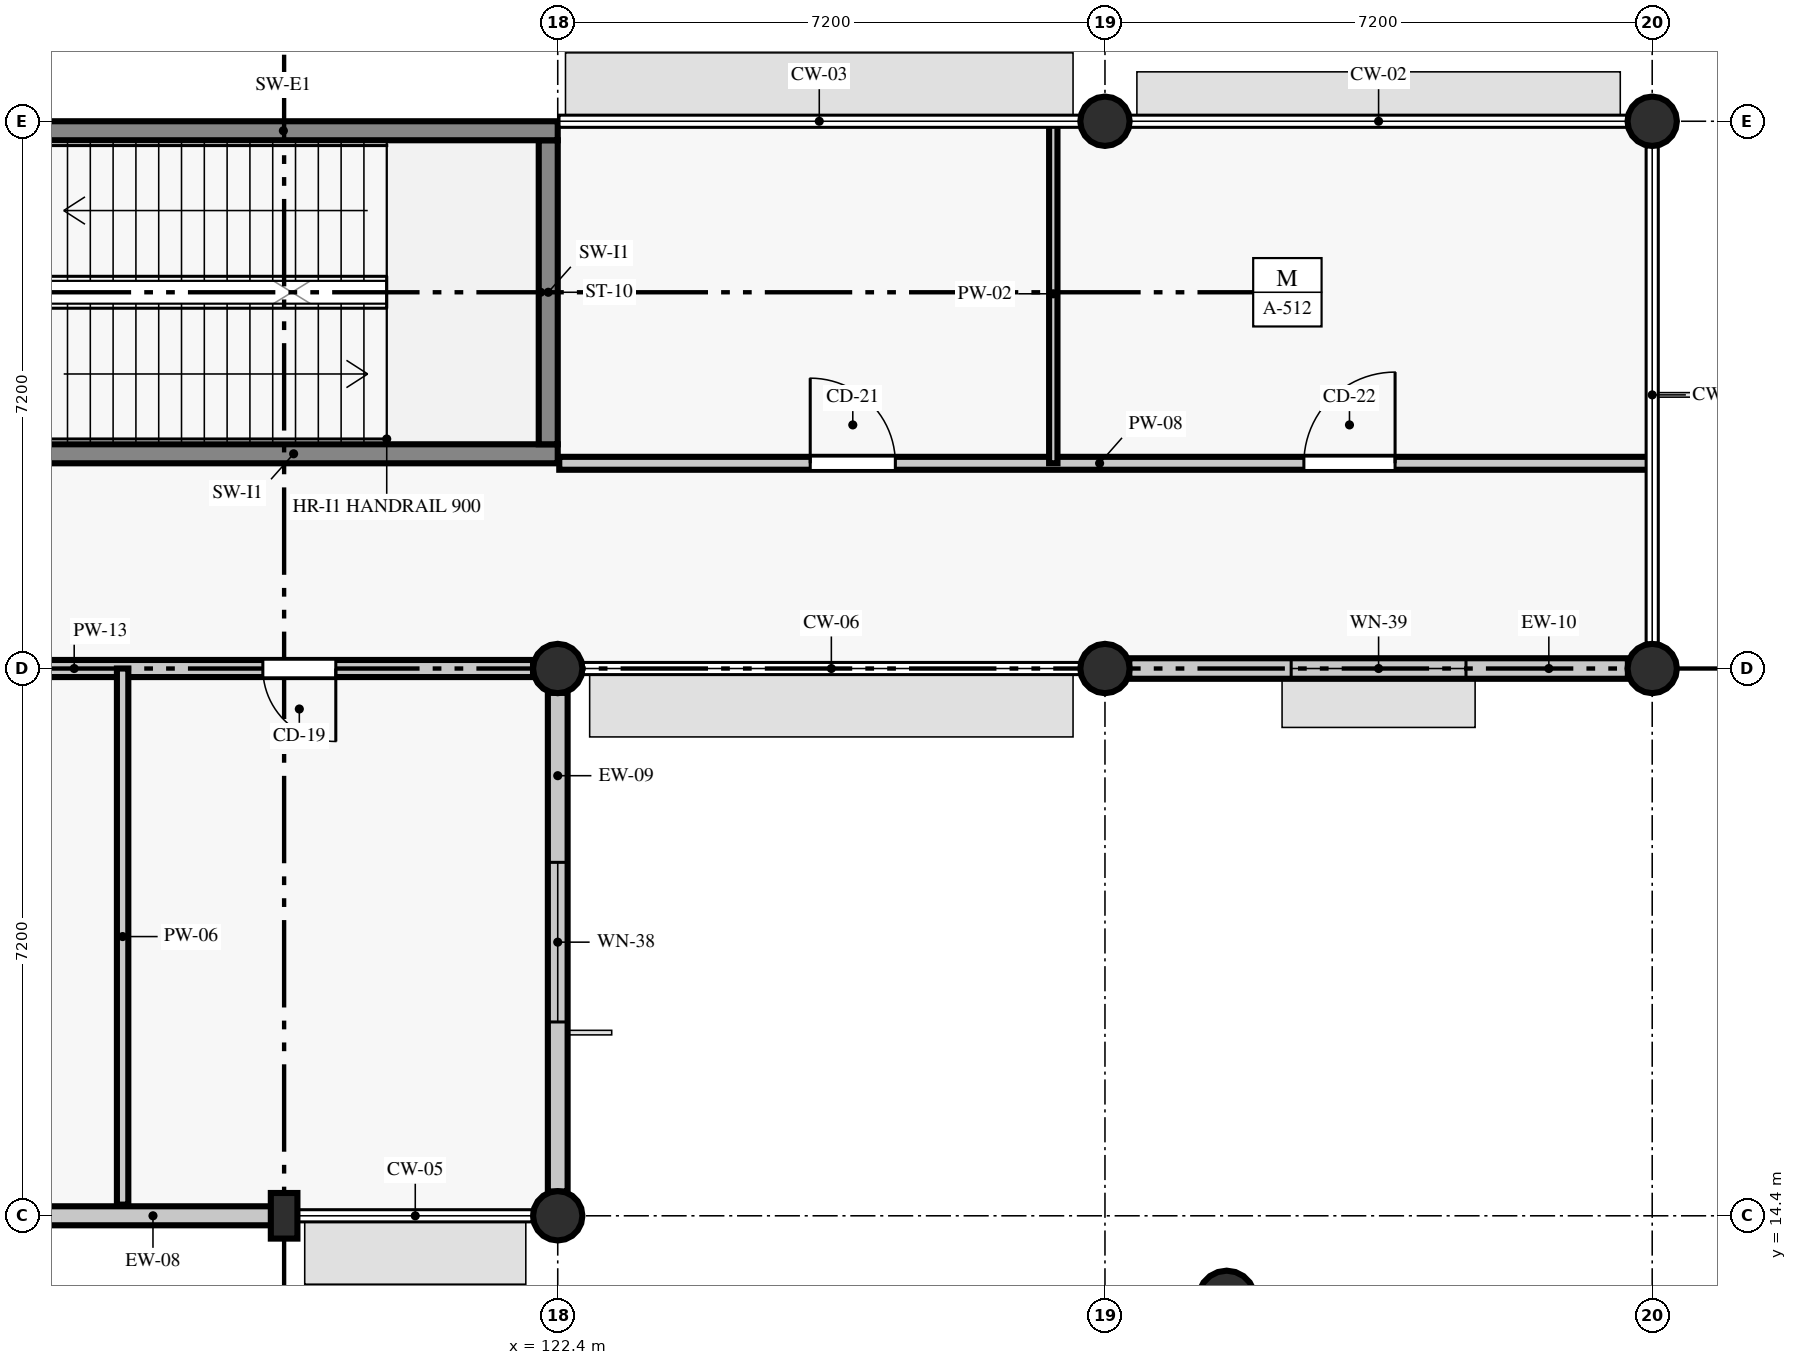
"""IFC4 building model, lengths in metres.
Left out: names, types, materials, properties, quantities, classifications, styles, units other than length and angle.
Written with IfcOpenShell. Run it as: python <this file> out.ifc"""

import sys

from ifc_helpers import new_model, si_unit, direction, frame, frame_2d, origin, origin_2d, place, context, subcontext, project, spatial, rectangle, circle, extrude, element, fill, save


model = new_model("IFC4")
c1 = context("Model", 3, precision=1e-05, world=origin(), true_north=direction((0.0, 1.0)))
c2 = subcontext(c1, "Body", "Model", "MODEL_VIEW")
j1 = project(units=[si_unit("LENGTHUNIT", "METRE"), si_unit("PLANEANGLEUNIT", "RADIAN")], contexts=[c1])
p1 = place(None, origin())
s1 = spatial("IfcSite", under=j1, at=p1, CompositionType="ELEMENT")
p2 = place(p1, origin())
s2 = spatial("IfcBuilding", under=s1, at=p2, CompositionType="ELEMENT")
p3 = place(p2, frame((0.0, 0.0, 4.8)))
s3 = spatial("IfcBuildingStorey", under=s2, at=p3, CompositionType="ELEMENT", Elevation=4.8)
for number, where, z_axis, x_axis in (
    (1, (122.4, 14.4, 0.0), (0.0, 0.0, 1.0), (1.0, 0.0, 0.0)),
    (2, (122.4, 21.6, 0.0), (0.0, 0.0, 1.0), (1.0, 0.0, 0.0)),
    (3, (129.6, 21.6, 0.0), (0.0, 0.0, 1.0), (1.0, 0.0, 0.0)),
    (4, (129.6, 28.8, 0.0), (0.0, 0.0, 1.0), (1.0, 0.0, 0.0)),
):
    element("IfcColumn", number, at=place(p3, frame(where, z_axis=z_axis, x_axis=x_axis)), inside=s3, PredefinedType="COLUMN", context=c2, shape_type="SweptSolid", body=[
        extrude(circle(Radius=0.325, at=origin_2d()), origin(), (0.0, 0.0, 1.0), 4.49),
    ])
for number, where, z_axis, x_axis in (
    (5, (136.8, 21.6, 0.0), (0.0, 0.0, 1.0), (1.0, 0.0, 0.0)),
    (6, (136.8, 28.8, 0.0), (0.0, 0.0, 1.0), (1.0, 0.0, 0.0)),
):
    element("IfcColumn", number, at=place(p3, frame(where, z_axis=z_axis, x_axis=x_axis)), inside=s3, PredefinedType="COLUMN", context=c2, shape_type="SweptSolid", body=[
        extrude(circle(Radius=0.325, at=origin_2d()), origin(), (0.0, 0.0, 1.0), 4.538),
    ])
p4 = place(p3, frame((118.8, 14.4, 0.0), z_axis=(0.0, 0.0, 1.0), x_axis=(1.0, 0.0, 0.0)))
e7 = element("IfcColumn", 7, at=p4, inside=s3, PredefinedType="PILASTER", context=c2, shape_type="SweptSolid", body=[
    extrude(rectangle(XDim=0.35, YDim=0.6, at=origin_2d()), origin(), (0.0, 0.0, 1.0), 4.49),
])
p5 = place(p3, frame((131.201, 13.303, 0.0), z_axis=(0.0, 0.0, 1.0), x_axis=(1.0, 0.0, 0.0)))
e8 = element("IfcColumn", 8, at=p5, inside=s3, PredefinedType="COLUMN", context=c2, shape_type="SweptSolid", body=[
    extrude(circle(Radius=0.375, at=origin_2d()), origin(), (0.0, 0.0, 1.0), 4.8),
])
p6 = place(p3, frame((115.52, 14.4, 0.0), z_axis=(0.0, 0.0, 1.0), x_axis=(1.0, 0.0, 0.0)))
e9 = element("IfcWall", 9, at=p6, inside=s3, PredefinedType="STANDARD", context=c2, shape_type="SweptSolid", body=[
    extrude(rectangle(XDim=3.109, YDim=0.25, at=frame_2d((1.554, 0.0))), origin(), (0.0, 0.0, 1.0), 3.84),
])
p7 = place(p3, frame((122.4, 14.72, 0.0), z_axis=(0.0, 0.0, 1.0), x_axis=(0.0, 1.0, 0.0)))
e10 = element("IfcWall", 10, at=p7, inside=s3, PredefinedType="STANDARD", context=c2, shape_type="SweptSolid", body=[
    extrude(rectangle(XDim=6.56, YDim=0.26, at=frame_2d((3.28, 0.0))), origin(), (0.0, 0.0, 1.0), 3.84),
])
p8 = place(p7, frame((2.23, 0.0, 0.9)))
e11 = element("IfcOpeningElement", 11, at=p8, cuts=e10, PredefinedType="OPENING", context=c2, shape_type="SweptSolid", body=[
    extrude(rectangle(XDim=2.1, YDim=1.66, at=frame_2d((1.05, 0.83))), frame((0.0, 0.14, 0.0), z_axis=(0.0, -1.0, 0.0), x_axis=(1.0, 0.0, 0.0)), (0.0, 0.0, 1.0), 0.28),
])
p9 = place(p3, frame((129.92, 21.6, 0.0), z_axis=(0.0, 0.0, 1.0), x_axis=(1.0, 0.0, 0.0)))
e12 = element("IfcWall", 12, at=p9, inside=s3, PredefinedType="STANDARD", context=c2, shape_type="SweptSolid", body=[
    extrude(rectangle(XDim=6.56, YDim=0.27, at=frame_2d((3.28, 0.0))), origin(), (0.0, 0.0, 1.0), 3.888),
])
p10 = place(p9, frame((2.13, 0.0, 0.9)))
e13 = element("IfcOpeningElement", 13, at=p10, cuts=e12, PredefinedType="OPENING", context=c2, shape_type="SweptSolid", body=[
    extrude(rectangle(XDim=2.3, YDim=1.66, at=frame_2d((1.15, 0.83))), frame((0.0, 0.145, 0.0), z_axis=(0.0, -1.0, 0.0), x_axis=(1.0, 0.0, 0.0)), (0.0, 0.0, 1.0), 0.29),
])
p11 = place(p3, frame((113.6, 24.425, 0.0), z_axis=(0.0, 0.0, 1.0), x_axis=(1.0, 0.0, 0.0)))
e14 = element("IfcWall", 14, at=p11, inside=s3, PredefinedType="SHEAR", context=c2, shape_type="SweptSolid", body=[
    extrude(rectangle(XDim=8.8, YDim=0.25, at=frame_2d((4.4, 0.0))), origin(), (0.0, 0.0, 1.0), 4.49),
])
p12 = place(p11, frame((0.3, 0.0, 0.0)))
e15 = element("IfcOpeningElement", 15, at=p12, cuts=e14, PredefinedType="OPENING", context=c2, shape_type="SweptSolid", body=[
    extrude(rectangle(XDim=1.5, YDim=2.15, at=frame_2d((0.75, 1.075))), frame((0.0, 0.135, 0.0), z_axis=(0.0, -1.0, 0.0), x_axis=(1.0, 0.0, 0.0)), (0.0, 0.0, 1.0), 0.27),
])
p13 = place(p3, frame((122.275, 24.55, 0.0), z_axis=(0.0, 0.0, 1.0), x_axis=(0.0, 1.0, 0.0)))
e16 = element("IfcWall", 16, at=p13, inside=s3, PredefinedType="SHEAR", context=c2, shape_type="SweptSolid", body=[
    extrude(rectangle(XDim=4.0, YDim=0.25, at=frame_2d((2.0, 0.0))), origin(), (0.0, 0.0, 1.0), 4.49),
])
p14 = place(p3, frame((122.4, 28.675, 0.0), z_axis=(0.0, 0.0, 1.0), x_axis=(-1.0, 0.0, 0.0)))
e17 = element("IfcWall", 17, at=p14, inside=s3, PredefinedType="SHEAR", context=c2, shape_type="SweptSolid", body=[
    extrude(rectangle(XDim=8.8, YDim=0.25, at=frame_2d((4.4, 0.0))), origin(), (0.0, 0.0, 1.0), 4.49),
])
p15 = place(p14, frame((7.27, 0.0, 0.92)))
e18 = element("IfcOpeningElement", 18, at=p15, cuts=e17, PredefinedType="OPENING", context=c2, shape_type="SweptSolid", body=[
    extrude(rectangle(XDim=1.18, YDim=1.48, at=frame_2d((0.59, 0.74))), frame((0.0, 0.135, 0.0), z_axis=(0.0, -1.0, 0.0), x_axis=(1.0, 0.0, 0.0)), (0.0, 0.0, 1.0), 0.27),
])
p16 = place(p3, frame((93.925, 21.6, 0.0), z_axis=(0.0, 0.0, 1.0), x_axis=(1.0, 0.0, 0.0)))
e19 = element("IfcWall", 19, at=p16, inside=s3, PredefinedType="PARTITIONING", context=c2, shape_type="SweptSolid", body=[
    extrude(rectangle(XDim=28.15, YDim=0.225, at=frame_2d((14.075, 0.0))), origin(), (0.0, 0.0, 1.0), 3.79),
])
p17 = place(p16, frame((2.858, 0.0, 0.0)))
e20 = element("IfcOpeningElement", 20, at=p17, cuts=e19, PredefinedType="OPENING", context=c2, shape_type="SweptSolid", body=[
    extrude(rectangle(XDim=0.92, YDim=2.18, at=frame_2d((0.46, 1.09))), frame((0.0, 0.123, 0.0), z_axis=(0.0, -1.0, 0.0), x_axis=(1.0, 0.0, 0.0)), (0.0, 0.0, 1.0), 0.245),
])
p18 = place(p16, frame((7.845, 0.0, 0.0)))
e21 = element("IfcOpeningElement", 21, at=p18, cuts=e19, PredefinedType="OPENING", context=c2, shape_type="SweptSolid", body=[
    extrude(rectangle(XDim=0.94, YDim=2.08, at=frame_2d((0.47, 1.04))), frame((0.0, 0.123, 0.0), z_axis=(0.0, -1.0, 0.0), x_axis=(1.0, 0.0, 0.0)), (0.0, 0.0, 1.0), 0.245),
])
p19 = place(p16, frame((9.995, 0.0, 0.0)))
e22 = element("IfcOpeningElement", 22, at=p19, cuts=e19, PredefinedType="OPENING", context=c2, shape_type="SweptSolid", body=[
    extrude(rectangle(XDim=0.9, YDim=2.08, at=frame_2d((0.45, 1.04))), frame((0.0, 0.123, 0.0), z_axis=(0.0, -1.0, 0.0), x_axis=(1.0, 0.0, 0.0)), (0.0, 0.0, 1.0), 0.245),
])
p20 = place(p16, frame((12.185, 0.0, 0.0)))
e23 = element("IfcOpeningElement", 23, at=p20, cuts=e19, PredefinedType="OPENING", context=c2, shape_type="SweptSolid", body=[
    extrude(rectangle(XDim=0.9, YDim=2.13, at=frame_2d((0.45, 1.065))), frame((0.0, 0.123, 0.0), z_axis=(0.0, -1.0, 0.0), x_axis=(1.0, 0.0, 0.0)), (0.0, 0.0, 1.0), 0.245),
])
p21 = place(p16, frame((16.296, 0.0, 0.0)))
e24 = element("IfcOpeningElement", 24, at=p21, cuts=e19, PredefinedType="OPENING", context=c2, shape_type="SweptSolid", body=[
    extrude(rectangle(XDim=1.13, YDim=2.18, at=frame_2d((0.565, 1.09))), frame((0.0, 0.123, 0.0), z_axis=(0.0, -1.0, 0.0), x_axis=(1.0, 0.0, 0.0)), (0.0, 0.0, 1.0), 0.245),
])
p22 = place(p16, frame((18.451, 0.0, 0.0)))
e25 = element("IfcOpeningElement", 25, at=p22, cuts=e19, PredefinedType="OPENING", context=c2, shape_type="SweptSolid", body=[
    extrude(rectangle(XDim=1.18, YDim=2.18, at=frame_2d((0.59, 1.09))), frame((0.0, 0.123, 0.0), z_axis=(0.0, -1.0, 0.0), x_axis=(1.0, 0.0, 0.0)), (0.0, 0.0, 1.0), 0.245),
])
p23 = place(p16, frame((24.595, 0.0, 0.0)))
e26 = element("IfcOpeningElement", 26, at=p23, cuts=e19, PredefinedType="OPENING", context=c2, shape_type="SweptSolid", body=[
    extrude(rectangle(XDim=0.96, YDim=2.23, at=frame_2d((0.48, 1.115))), frame((0.0, 0.123, 0.0), z_axis=(0.0, -1.0, 0.0), x_axis=(1.0, 0.0, 0.0)), (0.0, 0.0, 1.0), 0.245),
])
p24 = place(p3, frame((116.675, 14.547, 0.0), z_axis=(0.0, 0.0, 1.0), x_axis=(0.0, 1.0, 0.0)))
e27 = element("IfcWall", 27, at=p24, inside=s3, PredefinedType="PARTITIONING", context=c2, shape_type="SweptSolid", body=[
    extrude(rectangle(XDim=7.053, YDim=0.15, at=frame_2d((3.526, 0.0))), origin(), (0.0, 0.0, 1.0), 3.79),
])
p25 = place(p3, frame((122.42, 24.3, 0.0), z_axis=(0.0, 0.0, 1.0), x_axis=(1.0, 0.0, 0.0)))
e28 = element("IfcWall", 28, at=p25, inside=s3, PredefinedType="PARTITIONING", context=c2, shape_type="SweptSolid", body=[
    extrude(rectangle(XDim=14.34, YDim=0.17, at=frame_2d((7.17, 0.0))), origin(), (0.0, 0.0, 1.0), 3.888),
])
p26 = place(p25, frame((3.302, 0.0, 0.0)))
e29 = element("IfcOpeningElement", 29, at=p26, cuts=e28, PredefinedType="OPENING", context=c2, shape_type="SweptSolid", body=[
    extrude(rectangle(XDim=1.12, YDim=2.23, at=frame_2d((0.56, 1.115))), frame((0.0, 0.095, 0.0), z_axis=(0.0, -1.0, 0.0), x_axis=(1.0, 0.0, 0.0)), (0.0, 0.0, 1.0), 0.19),
])
p27 = place(p25, frame((9.797, 0.0, 0.0)))
e30 = element("IfcOpeningElement", 30, at=p27, cuts=e28, PredefinedType="OPENING", context=c2, shape_type="SweptSolid", body=[
    extrude(rectangle(XDim=1.2, YDim=2.23, at=frame_2d((0.6, 1.115))), frame((0.0, 0.095, 0.0), z_axis=(0.0, -1.0, 0.0), x_axis=(1.0, 0.0, 0.0)), (0.0, 0.0, 1.0), 0.19),
])
p28 = place(p3, frame((128.92, 24.3, 0.0), z_axis=(0.0, 0.0, 1.0), x_axis=(0.0, 1.0, 0.0)))
e31 = element("IfcWall", 31, at=p28, inside=s3, PredefinedType="PARTITIONING", context=c2, shape_type="SweptSolid", body=[
    extrude(rectangle(XDim=4.46, YDim=0.11, at=frame_2d((2.23, 0.0))), origin(), (0.0, 0.0, 1.0), 4.49),
])
p29 = place(p8, origin())
e32 = element("IfcWindow", 32, at=p29, inside=s3, PartitioningType="SINGLE_PANEL", PredefinedType="WINDOW", context=c2, shape_type="SweptSolid", body=[
    extrude(rectangle(XDim=2.1, YDim=1.66, at=frame_2d((1.05, 0.83))), frame((0.0, 0.03, 0.0), z_axis=(0.0, -1.0, 0.0), x_axis=(1.0, 0.0, 0.0)), (0.0, 0.0, 1.0), 0.06),
])
fill(e11, e32)
p30 = place(p10, origin())
e33 = element("IfcWindow", 33, at=p30, inside=s3, PartitioningType="SINGLE_PANEL", PredefinedType="WINDOW", context=c2, shape_type="SweptSolid", body=[
    extrude(rectangle(XDim=2.3, YDim=1.66, at=frame_2d((1.15, 0.83))), frame((0.0, 0.03, 0.0), z_axis=(0.0, -1.0, 0.0), x_axis=(1.0, 0.0, 0.0)), (0.0, 0.0, 1.0), 0.06),
])
fill(e13, e33)
p31 = place(p23, frame((0.96, 0.0, 0.0), z_axis=(0.0, 0.0, 1.0), x_axis=(-1.0, 0.0, 0.0)))
e34 = element("IfcDoor", 34, at=p31, inside=s3, OperationType="SINGLE_SWING_LEFT", PredefinedType="DOOR", context=c2, shape_type="SweptSolid", body=[
    extrude(rectangle(XDim=0.96, YDim=2.23, at=frame_2d((0.48, 1.115))), frame((0.0, 0.025, 0.0), z_axis=(0.0, -1.0, 0.0), x_axis=(1.0, 0.0, 0.0)), (0.0, 0.0, 1.0), 0.05),
])
fill(e26, e34)
p32 = place(p26, origin())
e35 = element("IfcDoor", 35, at=p32, inside=s3, OperationType="SINGLE_SWING_LEFT", PredefinedType="DOOR", context=c2, shape_type="SweptSolid", body=[
    extrude(rectangle(XDim=1.12, YDim=2.23, at=frame_2d((0.56, 1.115))), frame((0.0, 0.025, 0.0), z_axis=(0.0, -1.0, 0.0), x_axis=(1.0, 0.0, 0.0)), (0.0, 0.0, 1.0), 0.05),
])
fill(e29, e35)
p33 = place(p27, origin())
e36 = element("IfcDoor", 36, at=p33, inside=s3, OperationType="SINGLE_SWING_RIGHT", PredefinedType="DOOR", context=c2, shape_type="SweptSolid", body=[
    extrude(rectangle(XDim=1.2, YDim=2.23, at=frame_2d((0.6, 1.115))), frame((0.0, 0.025, 0.0), z_axis=(0.0, -1.0, 0.0), x_axis=(1.0, 0.0, 0.0)), (0.0, 0.0, 1.0), 0.05),
])
fill(e30, e36)
save(model, sys.argv[1])
